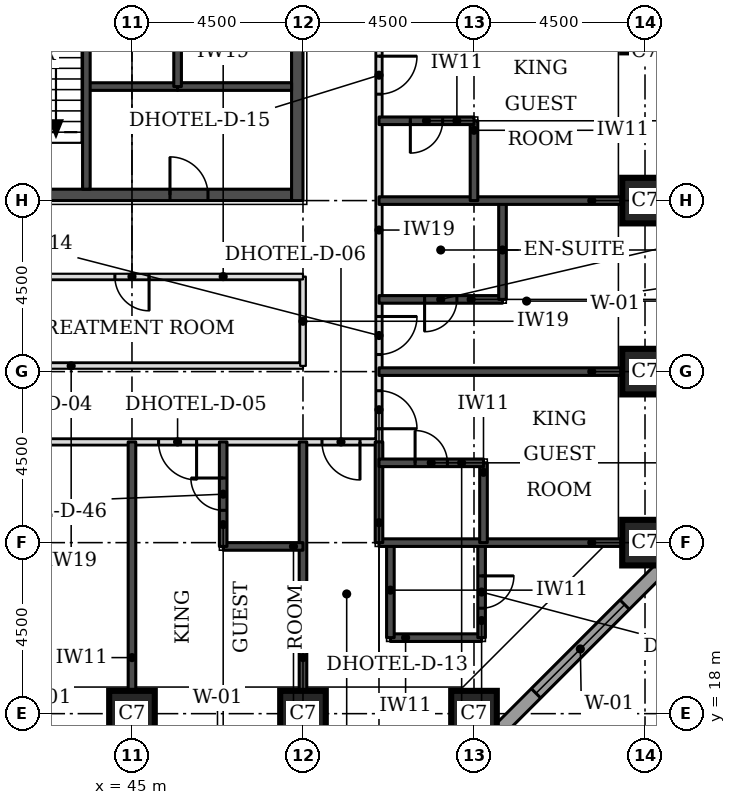
"""IFC4 building model, lengths in metres.
Left out: names, types, materials, properties, quantities, classifications, styles, units other than length and angle.
Written with IfcOpenShell. Run it as: python <this file> out.ifc"""

import sys

from ifc_helpers import new_model, si_unit, direction, frame, frame_2d, origin, origin_2d, place, context, subcontext, project, spatial, rectangle, extrude, element, fill, save


model = new_model("IFC4")
c1 = context("Model", 3, precision=1e-05, world=origin(), true_north=direction((0.0, 1.0)))
c2 = subcontext(c1, "Body", "Model", "MODEL_VIEW")
j1 = project(units=[si_unit("LENGTHUNIT", "METRE"), si_unit("PLANEANGLEUNIT", "RADIAN")], contexts=[c1])
p1 = place(None, origin())
s1 = spatial("IfcSite", under=j1, at=p1, CompositionType="ELEMENT")
p2 = place(p1, origin())
s2 = spatial("IfcBuilding", under=s1, at=p2, CompositionType="ELEMENT")
p3 = place(p2, frame((0.0, 0.0, 36.3)))
s3 = spatial("IfcBuildingStorey", under=s2, at=p3, CompositionType="ELEMENT", Elevation=36.3)
for number, where, z_axis, x_axis in (
    (1, (45.0, 18.0, 0.0), (0.0, 0.0, 1.0), (1.0, 0.0, 0.0)),
    (2, (49.5, 18.0, 0.0), (0.0, 0.0, 1.0), (1.0, 0.0, 0.0)),
    (3, (54.0, 18.0, 0.0), (0.0, 0.0, 1.0), (1.0, 0.0, 0.0)),
    (4, (58.5, 22.5, 0.0), (0.0, 0.0, 1.0), (1.0, 0.0, 0.0)),
    (5, (58.5, 27.0, 0.0), (0.0, 0.0, 1.0), (1.0, 0.0, 0.0)),
    (6, (58.5, 31.5, 0.0), (0.0, 0.0, 1.0), (1.0, 0.0, 0.0)),
):
    element("IfcColumn", number, at=place(p3, frame(where, z_axis=z_axis, x_axis=x_axis)), inside=s3, PredefinedType="COLUMN", context=c2, shape_type="SweptSolid", body=[
        extrude(rectangle(XDim=1.2, YDim=1.2, at=origin_2d()), origin(), (0.0, 0.0, 1.0), 3.3),
    ])
p4 = place(p3, frame((40.8, 31.65, 0.0), z_axis=(0.0, 0.0, 1.0), x_axis=(1.0, 0.0, 0.0)))
e7 = element("IfcWall", 7, at=p4, inside=s3, PredefinedType="SHEAR", context=c2, shape_type="SweptSolid", body=[
    extrude(rectangle(XDim=8.4, YDim=0.3, at=frame_2d((4.2, 0.0))), origin(), (0.0, 0.0, 1.0), 3.3),
])
p5 = place(p4, frame((5.2, 0.0, 0.0)))
e8 = element("IfcOpeningElement", 8, at=p5, cuts=e7, PredefinedType="OPENING", context=c2, shape_type="SweptSolid", body=[
    extrude(rectangle(XDim=1.0, YDim=2.1, at=frame_2d((0.5, 1.05))), frame((0.0, 0.16, 0.0), z_axis=(0.0, -1.0, 0.0), x_axis=(1.0, 0.0, 0.0)), (0.0, 0.0, 1.0), 0.32),
])
p6 = place(p3, frame((49.35, 31.5, 0.0), z_axis=(0.0, 0.0, 1.0), x_axis=(0.0, 1.0, 0.0)))
e9 = element("IfcWall", 9, at=p6, inside=s3, PredefinedType="SHEAR", context=c2, shape_type="SweptSolid", body=[
    extrude(rectangle(XDim=9.0, YDim=0.3, at=frame_2d((4.5, 0.0))), origin(), (0.0, 0.0, 1.0), 3.3),
])
p7 = place(p3, frame((54.27, 17.174, 0.0), z_axis=(0.0, 0.0, 1.0), x_axis=(0.707106781187, 0.707106781187, 0.0)))
e10 = element("IfcWall", 10, at=p7, inside=s3, PredefinedType="STANDARD", context=c2, shape_type="SweptSolid", body=[
    extrude(rectangle(XDim=7.151, YDim=0.35, at=frame_2d((3.576, 0.0))), origin(), (0.0, 0.0, 1.0), 3.055),
])
p8 = place(p7, frame((1.926, 0.0, 0.8)))
e11 = element("IfcOpeningElement", 11, at=p8, cuts=e10, PredefinedType="OPENING", context=c2, shape_type="SweptSolid", body=[
    extrude(rectangle(XDim=3.3, YDim=1.5, at=frame_2d((1.65, 0.75))), frame((0.0, 0.185, 0.0), z_axis=(0.0, -1.0, 0.0), x_axis=(1.0, 0.0, 0.0)), (0.0, 0.0, 1.0), 0.37),
])
p9 = place(p3, frame((19.15, 25.15, 0.0), z_axis=(0.0, 0.0, 1.0), x_axis=(1.0, 0.0, 0.0)))
e12 = element("IfcWall", 12, at=p9, inside=s3, PredefinedType="PARTITIONING", context=c2, shape_type="SweptSolid", body=[
    extrude(rectangle(XDim=32.35, YDim=0.15, at=frame_2d((16.175, 0.0))), origin(), (0.0, 0.0, 1.0), 3.08),
])
p10 = place(p9, frame((6.4, 0.0, 0.0)))
e13 = element("IfcOpeningElement", 13, at=p10, cuts=e12, PredefinedType="OPENING", context=c2, shape_type="SweptSolid", body=[
    extrude(rectangle(XDim=1.0, YDim=2.1, at=frame_2d((0.5, 1.05))), frame((0.0, 0.085, 0.0), z_axis=(0.0, -1.0, 0.0), x_axis=(1.0, 0.0, 0.0)), (0.0, 0.0, 1.0), 0.17),
])
p11 = place(p9, frame((10.5, 0.0, 0.0)))
e14 = element("IfcOpeningElement", 14, at=p11, cuts=e12, PredefinedType="OPENING", context=c2, shape_type="SweptSolid", body=[
    extrude(rectangle(XDim=1.0, YDim=2.1, at=frame_2d((0.5, 1.05))), frame((0.0, 0.085, 0.0), z_axis=(0.0, -1.0, 0.0), x_axis=(1.0, 0.0, 0.0)), (0.0, 0.0, 1.0), 0.17),
])
p12 = place(p9, frame((22.45, 0.0, 0.0)))
e15 = element("IfcOpeningElement", 15, at=p12, cuts=e12, PredefinedType="OPENING", context=c2, shape_type="SweptSolid", body=[
    extrude(rectangle(XDim=1.0, YDim=2.1, at=frame_2d((0.5, 1.05))), frame((0.0, 0.085, 0.0), z_axis=(0.0, -1.0, 0.0), x_axis=(1.0, 0.0, 0.0)), (0.0, 0.0, 1.0), 0.17),
])
p13 = place(p9, frame((26.55, 0.0, 0.0)))
e16 = element("IfcOpeningElement", 16, at=p13, cuts=e12, PredefinedType="OPENING", context=c2, shape_type="SweptSolid", body=[
    extrude(rectangle(XDim=1.0, YDim=2.1, at=frame_2d((0.5, 1.05))), frame((0.0, 0.085, 0.0), z_axis=(0.0, -1.0, 0.0), x_axis=(1.0, 0.0, 0.0)), (0.0, 0.0, 1.0), 0.17),
])
p14 = place(p9, frame((1.175, 0.0, 0.0)))
e17 = element("IfcOpeningElement", 17, at=p14, cuts=e12, PredefinedType="OPENING", context=c2, shape_type="SweptSolid", body=[
    extrude(rectangle(XDim=1.0, YDim=2.1, at=frame_2d((0.5, 1.05))), frame((0.0, 0.085, 0.0), z_axis=(0.0, -1.0, 0.0), x_axis=(1.0, 0.0, 0.0)), (0.0, 0.0, 1.0), 0.17),
])
p15 = place(p9, frame((30.85, 0.0, 0.0)))
e18 = element("IfcOpeningElement", 18, at=p15, cuts=e12, PredefinedType="OPENING", context=c2, shape_type="SweptSolid", body=[
    extrude(rectangle(XDim=1.0, YDim=2.1, at=frame_2d((0.5, 1.05))), frame((0.0, 0.085, 0.0), z_axis=(0.0, -1.0, 0.0), x_axis=(1.0, 0.0, 0.0)), (0.0, 0.0, 1.0), 0.17),
])
p16 = place(p3, frame((51.5, 25.15, 0.0), z_axis=(0.0, 0.0, 1.0), x_axis=(0.0, 1.0, 0.0)))
e19 = element("IfcWall", 19, at=p16, inside=s3, PredefinedType="PARTITIONING", context=c2, shape_type="SweptSolid", body=[
    extrude(rectangle(XDim=22.35, YDim=0.15, at=frame_2d((11.175, 0.0))), origin(), (0.0, 0.0, 1.0), 3.08),
])
p17 = place(p16, frame((0.347, 0.0, 0.0)))
e20 = element("IfcOpeningElement", 20, at=p17, cuts=e19, PredefinedType="OPENING", context=c2, shape_type="SweptSolid", body=[
    extrude(rectangle(XDim=1.0, YDim=2.1, at=frame_2d((0.5, 1.05))), frame((0.0, 0.085, 0.0), z_axis=(0.0, -1.0, 0.0), x_axis=(1.0, 0.0, 0.0)), (0.0, 0.0, 1.0), 0.17),
])
p18 = place(p16, frame((2.3, 0.0, 0.0)))
e21 = element("IfcOpeningElement", 21, at=p18, cuts=e19, PredefinedType="OPENING", context=c2, shape_type="SweptSolid", body=[
    extrude(rectangle(XDim=1.0, YDim=2.1, at=frame_2d((0.5, 1.05))), frame((0.0, 0.085, 0.0), z_axis=(0.0, -1.0, 0.0), x_axis=(1.0, 0.0, 0.0)), (0.0, 0.0, 1.0), 0.17),
])
p19 = place(p16, frame((9.15, 0.0, 0.0)))
e22 = element("IfcOpeningElement", 22, at=p19, cuts=e19, PredefinedType="OPENING", context=c2, shape_type="SweptSolid", body=[
    extrude(rectangle(XDim=1.0, YDim=2.1, at=frame_2d((0.5, 1.05))), frame((0.0, 0.085, 0.0), z_axis=(0.0, -1.0, 0.0), x_axis=(1.0, 0.0, 0.0)), (0.0, 0.0, 1.0), 0.17),
])
p20 = place(p16, frame((11.3, 0.0, 0.0)))
e23 = element("IfcOpeningElement", 23, at=p20, cuts=e19, PredefinedType="OPENING", context=c2, shape_type="SweptSolid", body=[
    extrude(rectangle(XDim=1.0, YDim=2.1, at=frame_2d((0.5, 1.05))), frame((0.0, 0.085, 0.0), z_axis=(0.0, -1.0, 0.0), x_axis=(1.0, 0.0, 0.0)), (0.0, 0.0, 1.0), 0.17),
])
p21 = place(p16, frame((18.4, 0.0, 0.0)))
e24 = element("IfcOpeningElement", 24, at=p21, cuts=e19, PredefinedType="OPENING", context=c2, shape_type="SweptSolid", body=[
    extrude(rectangle(XDim=0.9, YDim=2.1, at=frame_2d((0.45, 1.05))), frame((0.0, 0.085, 0.0), z_axis=(0.0, -1.0, 0.0), x_axis=(1.0, 0.0, 0.0)), (0.0, 0.0, 1.0), 0.17),
])
p22 = place(p3, frame((40.5, 27.15, 0.0), z_axis=(0.0, 0.0, 1.0), x_axis=(1.0, 0.0, 0.0)))
e25 = element("IfcWall", 25, at=p22, inside=s3, PredefinedType="PARTITIONING", context=c2, shape_type="SweptSolid", body=[
    extrude(rectangle(XDim=9.0, YDim=0.15, at=frame_2d((4.5, 0.0))), origin(), (0.0, 0.0, 1.0), 3.08),
])
p23 = place(p3, frame((49.5, 27.15, 0.0), z_axis=(0.0, 0.0, 1.0), x_axis=(0.0, 1.0, 0.0)))
e26 = element("IfcWall", 26, at=p23, inside=s3, PredefinedType="PARTITIONING", context=c2, shape_type="SweptSolid", body=[
    extrude(rectangle(XDim=2.35, YDim=0.15, at=frame_2d((1.175, 0.0))), origin(), (0.0, 0.0, 1.0), 3.08),
])
p24 = place(p3, frame((40.5, 29.5, 0.0), z_axis=(0.0, 0.0, 1.0), x_axis=(1.0, 0.0, 0.0)))
e27 = element("IfcWall", 27, at=p24, inside=s3, PredefinedType="PARTITIONING", context=c2, shape_type="SweptSolid", body=[
    extrude(rectangle(XDim=9.0, YDim=0.15, at=frame_2d((4.5, 0.0))), origin(), (0.0, 0.0, 1.0), 3.08),
])
p25 = place(p24, frame((4.05, 0.0, 0.0)))
e28 = element("IfcOpeningElement", 28, at=p25, cuts=e27, PredefinedType="OPENING", context=c2, shape_type="SweptSolid", body=[
    extrude(rectangle(XDim=0.9, YDim=2.1, at=frame_2d((0.45, 1.05))), frame((0.0, 0.085, 0.0), z_axis=(0.0, -1.0, 0.0), x_axis=(1.0, 0.0, 0.0)), (0.0, 0.0, 1.0), 0.17),
])
for number, where, z_axis, x_axis in (
    (29, (45.0, 18.6, 0.0), (0.0, 0.0, 1.0), (0.0, 1.0, 0.0)),
    (30, (49.5, 18.6, 0.0), (0.0, 0.0, 1.0), (0.0, 1.0, 0.0)),
):
    element("IfcWall", number, at=place(p3, frame(where, z_axis=z_axis, x_axis=x_axis)), inside=s3, PredefinedType="SOLIDWALL", context=c2, shape_type="SweptSolid", body=[
        extrude(rectangle(XDim=6.55, YDim=0.2, at=frame_2d((3.275, 0.0))), origin(), (0.0, 0.0, 1.0), 3.08),
    ])
p26 = place(p3, frame((51.8, 20.0, 0.0), z_axis=(0.0, 0.0, 1.0), x_axis=(1.0, 0.0, 0.0)))
e31 = element("IfcWall", 31, at=p26, inside=s3, PredefinedType="SOLIDWALL", context=c2, shape_type="SweptSolid", body=[
    extrude(rectangle(XDim=2.4, YDim=0.2, at=frame_2d((1.2, 0.0))), origin(), (0.0, 0.0, 1.0), 3.08),
])
p27 = place(p3, frame((51.8, 20.0, 0.0), z_axis=(0.0, 0.0, 1.0), x_axis=(0.0, 1.0, 0.0)))
e32 = element("IfcWall", 32, at=p27, inside=s3, PredefinedType="SOLIDWALL", context=c2, shape_type="SweptSolid", body=[
    extrude(rectangle(XDim=2.5, YDim=0.2, at=frame_2d((1.25, 0.0))), origin(), (0.0, 0.0, 1.0), 3.08),
])
p28 = place(p3, frame((54.2, 20.0, 0.0), z_axis=(0.0, 0.0, 1.0), x_axis=(0.0, 1.0, 0.0)))
e33 = element("IfcWall", 33, at=p28, inside=s3, PredefinedType="SOLIDWALL", context=c2, shape_type="SweptSolid", body=[
    extrude(rectangle(XDim=2.5, YDim=0.2, at=frame_2d((1.25, 0.0))), origin(), (0.0, 0.0, 1.0), 3.08),
])
p29 = place(p28, frame((0.775, 0.0, 0.0)))
e34 = element("IfcOpeningElement", 34, at=p29, cuts=e33, PredefinedType="OPENING", context=c2, shape_type="SweptSolid", body=[
    extrude(rectangle(XDim=0.85, YDim=2.1, at=frame_2d((0.425, 1.05))), frame((0.0, 0.11, 0.0), z_axis=(0.0, -1.0, 0.0), x_axis=(1.0, 0.0, 0.0)), (0.0, 0.0, 1.0), 0.22),
])
p30 = place(p3, frame((47.4, 22.4, 0.0), z_axis=(0.0, 0.0, 1.0), x_axis=(1.0, 0.0, 0.0)))
e35 = element("IfcWall", 35, at=p30, inside=s3, PredefinedType="SOLIDWALL", context=c2, shape_type="SweptSolid", body=[
    extrude(rectangle(XDim=2.1, YDim=0.2, at=frame_2d((1.05, 0.0))), origin(), (0.0, 0.0, 1.0), 3.08),
])
p31 = place(p3, frame((47.4, 22.4, 0.0), z_axis=(0.0, 0.0, 1.0), x_axis=(0.0, 1.0, 0.0)))
e36 = element("IfcWall", 36, at=p31, inside=s3, PredefinedType="SOLIDWALL", context=c2, shape_type="SweptSolid", body=[
    extrude(rectangle(XDim=2.75, YDim=0.2, at=frame_2d((1.375, 0.0))), origin(), (0.0, 0.0, 1.0), 3.08),
])
p32 = place(p31, frame((0.95, 0.0, 0.0)))
e37 = element("IfcOpeningElement", 37, at=p32, cuts=e36, PredefinedType="OPENING", context=c2, shape_type="SweptSolid", body=[
    extrude(rectangle(XDim=0.85, YDim=2.1, at=frame_2d((0.425, 1.05))), frame((0.0, 0.11, 0.0), z_axis=(0.0, -1.0, 0.0), x_axis=(1.0, 0.0, 0.0)), (0.0, 0.0, 1.0), 0.22),
])
p33 = place(p3, frame((51.5, 22.5, 0.0), z_axis=(0.0, 0.0, 1.0), x_axis=(1.0, 0.0, 0.0)))
e38 = element("IfcWall", 38, at=p33, inside=s3, PredefinedType="SOLIDWALL", context=c2, shape_type="SweptSolid", body=[
    extrude(rectangle(XDim=6.4, YDim=0.2, at=frame_2d((3.2, 0.0))), origin(), (0.0, 0.0, 1.0), 3.08),
])
p34 = place(p3, frame((51.5, 22.5, 0.0), z_axis=(0.0, 0.0, 1.0), x_axis=(0.0, 1.0, 0.0)))
e39 = element("IfcWall", 39, at=p34, inside=s3, PredefinedType="SOLIDWALL", context=c2, shape_type="SweptSolid", body=[
    extrude(rectangle(XDim=2.65, YDim=0.2, at=frame_2d((1.325, 0.0))), origin(), (0.0, 0.0, 1.0), 3.08),
])
p35 = place(p3, frame((54.25, 22.5, 0.0), z_axis=(0.0, 0.0, 1.0), x_axis=(0.0, 1.0, 0.0)))
e40 = element("IfcWall", 40, at=p35, inside=s3, PredefinedType="SOLIDWALL", context=c2, shape_type="SweptSolid", body=[
    extrude(rectangle(XDim=2.1, YDim=0.2, at=frame_2d((1.05, 0.0))), origin(), (0.0, 0.0, 1.0), 3.08),
])
p36 = place(p3, frame((51.5, 24.6, 0.0), z_axis=(0.0, 0.0, 1.0), x_axis=(1.0, 0.0, 0.0)))
e41 = element("IfcWall", 41, at=p36, inside=s3, PredefinedType="SOLIDWALL", context=c2, shape_type="SweptSolid", body=[
    extrude(rectangle(XDim=2.75, YDim=0.2, at=frame_2d((1.375, 0.0))), origin(), (0.0, 0.0, 1.0), 3.08),
])
p37 = place(p36, frame((0.95, 0.0, 0.0)))
e42 = element("IfcOpeningElement", 42, at=p37, cuts=e41, PredefinedType="OPENING", context=c2, shape_type="SweptSolid", body=[
    extrude(rectangle(XDim=0.85, YDim=2.1, at=frame_2d((0.425, 1.05))), frame((0.0, 0.11, 0.0), z_axis=(0.0, -1.0, 0.0), x_axis=(1.0, 0.0, 0.0)), (0.0, 0.0, 1.0), 0.22),
])
p38 = place(p3, frame((51.5, 27.0, 0.0), z_axis=(0.0, 0.0, 1.0), x_axis=(1.0, 0.0, 0.0)))
e43 = element("IfcWall", 43, at=p38, inside=s3, PredefinedType="SOLIDWALL", context=c2, shape_type="SweptSolid", body=[
    extrude(rectangle(XDim=6.4, YDim=0.2, at=frame_2d((3.2, 0.0))), origin(), (0.0, 0.0, 1.0), 3.08),
])
p39 = place(p3, frame((51.5, 28.9, 0.0), z_axis=(0.0, 0.0, 1.0), x_axis=(1.0, 0.0, 0.0)))
e44 = element("IfcWall", 44, at=p39, inside=s3, PredefinedType="SOLIDWALL", context=c2, shape_type="SweptSolid", body=[
    extrude(rectangle(XDim=3.25, YDim=0.2, at=frame_2d((1.625, 0.0))), origin(), (0.0, 0.0, 1.0), 3.08),
])
p40 = place(p39, frame((1.2, 0.0, 0.0)))
e45 = element("IfcOpeningElement", 45, at=p40, cuts=e44, PredefinedType="OPENING", context=c2, shape_type="SweptSolid", body=[
    extrude(rectangle(XDim=0.85, YDim=2.1, at=frame_2d((0.425, 1.05))), frame((0.0, 0.11, 0.0), z_axis=(0.0, -1.0, 0.0), x_axis=(1.0, 0.0, 0.0)), (0.0, 0.0, 1.0), 0.22),
])
p41 = place(p3, frame((54.75, 28.9, 0.0), z_axis=(0.0, 0.0, 1.0), x_axis=(0.0, 1.0, 0.0)))
e46 = element("IfcWall", 46, at=p41, inside=s3, PredefinedType="SOLIDWALL", context=c2, shape_type="SweptSolid", body=[
    extrude(rectangle(XDim=2.6, YDim=0.2, at=frame_2d((1.3, 0.0))), origin(), (0.0, 0.0, 1.0), 3.08),
])
p42 = place(p3, frame((51.5, 31.5, 0.0), z_axis=(0.0, 0.0, 1.0), x_axis=(1.0, 0.0, 0.0)))
e47 = element("IfcWall", 47, at=p42, inside=s3, PredefinedType="SOLIDWALL", context=c2, shape_type="SweptSolid", body=[
    extrude(rectangle(XDim=6.4, YDim=0.2, at=frame_2d((3.2, 0.0))), origin(), (0.0, 0.0, 1.0), 3.08),
])
p43 = place(p3, frame((54.0, 31.5, 0.0), z_axis=(0.0, 0.0, 1.0), x_axis=(0.0, 1.0, 0.0)))
e48 = element("IfcWall", 48, at=p43, inside=s3, PredefinedType="SOLIDWALL", context=c2, shape_type="SweptSolid", body=[
    extrude(rectangle(XDim=2.1, YDim=0.2, at=frame_2d((1.05, 0.0))), origin(), (0.0, 0.0, 1.0), 3.08),
])
p44 = place(p3, frame((51.5, 33.6, 0.0), z_axis=(0.0, 0.0, 1.0), x_axis=(1.0, 0.0, 0.0)))
e49 = element("IfcWall", 49, at=p44, inside=s3, PredefinedType="SOLIDWALL", context=c2, shape_type="SweptSolid", body=[
    extrude(rectangle(XDim=2.5, YDim=0.2, at=frame_2d((1.25, 0.0))), origin(), (0.0, 0.0, 1.0), 3.08),
])
p45 = place(p44, frame((0.825, 0.0, 0.0)))
e50 = element("IfcOpeningElement", 50, at=p45, cuts=e49, PredefinedType="OPENING", context=c2, shape_type="SweptSolid", body=[
    extrude(rectangle(XDim=0.85, YDim=2.1, at=frame_2d((0.425, 1.05))), frame((0.0, 0.11, 0.0), z_axis=(0.0, -1.0, 0.0), x_axis=(1.0, 0.0, 0.0)), (0.0, 0.0, 1.0), 0.22),
])
p46 = place(p3, frame((43.8, 34.5, 0.0), z_axis=(0.0, 0.0, 1.0), x_axis=(1.0, 0.0, 0.0)))
e51 = element("IfcWall", 51, at=p46, inside=s3, PredefinedType="SOLIDWALL", context=c2, shape_type="SweptSolid", body=[
    extrude(rectangle(XDim=2.4, YDim=0.2, at=frame_2d((1.2, 0.0))), origin(), (0.0, 0.0, 1.0), 3.08),
])
p47 = place(p3, frame((46.2, 34.5, 0.0), z_axis=(0.0, 0.0, 1.0), x_axis=(1.0, 0.0, 0.0)))
e52 = element("IfcWall", 52, at=p47, inside=s3, PredefinedType="SOLIDWALL", context=c2, shape_type="SweptSolid", body=[
    extrude(rectangle(XDim=3.0, YDim=0.2, at=frame_2d((1.5, 0.0))), origin(), (0.0, 0.0, 1.0), 3.08),
])
for number, where, z_axis, x_axis in (
    (53, (43.8, 31.8, 0.0), (0.0, 0.0, 1.0), (0.0, 1.0, 0.0)),
    (54, (46.2, 34.5, 0.0), (0.0, 0.0, 1.0), (0.0, 1.0, 0.0)),
):
    element("IfcWall", number, at=place(p3, frame(where, z_axis=z_axis, x_axis=x_axis)), inside=s3, PredefinedType="SOLIDWALL", context=c2, shape_type="SweptSolid", body=[
        extrude(rectangle(XDim=5.7, YDim=0.2, at=frame_2d((2.85, 0.0))), origin(), (0.0, 0.0, 1.0), 3.08),
    ])
p48 = place(p8, origin())
e55 = element("IfcWindow", 55, at=p48, inside=s3, PartitioningType="SINGLE_PANEL", PredefinedType="WINDOW", context=c2, shape_type="SweptSolid", body=[
    extrude(rectangle(XDim=3.3, YDim=1.5, at=frame_2d((1.65, 0.75))), frame((0.0, 0.085, 0.0), z_axis=(0.0, -1.0, 0.0), x_axis=(1.0, 0.0, 0.0)), (0.0, 0.0, 1.0), 0.06),
])
fill(e11, e55)
p49 = place(p13, frame((1.0, 0.0, 0.0), z_axis=(0.0, 0.0, 1.0), x_axis=(-1.0, 0.0, 0.0)))
e56 = element("IfcDoor", 56, at=p49, inside=s3, OperationType="SINGLE_SWING_LEFT", PredefinedType="DOOR", context=c2, shape_type="SweptSolid", body=[
    extrude(rectangle(XDim=1.0, YDim=2.1, at=frame_2d((0.5, 1.05))), frame((0.0, 0.025, 0.0), z_axis=(0.0, -1.0, 0.0), x_axis=(1.0, 0.0, 0.0)), (0.0, 0.0, 1.0), 0.05),
])
fill(e16, e56)
p50 = place(p32, origin())
e57 = element("IfcDoor", 57, at=p50, inside=s3, OperationType="SINGLE_SWING_RIGHT", PredefinedType="DOOR", context=c2, shape_type="SweptSolid", body=[
    extrude(rectangle(XDim=0.85, YDim=2.1, at=frame_2d((0.425, 1.05))), frame((0.0, 0.025, 0.0), z_axis=(0.0, -1.0, 0.0), x_axis=(1.0, 0.0, 0.0)), (0.0, 0.0, 1.0), 0.05),
])
fill(e37, e57)
p51 = place(p17, frame((1.0, 0.0, 0.0), z_axis=(0.0, 0.0, 1.0), x_axis=(-1.0, 0.0, 0.0)))
e58 = element("IfcDoor", 58, at=p51, inside=s3, OperationType="SINGLE_SWING_RIGHT", PredefinedType="DOOR", context=c2, shape_type="SweptSolid", body=[
    extrude(rectangle(XDim=1.0, YDim=2.1, at=frame_2d((0.5, 1.05))), frame((0.0, 0.025, 0.0), z_axis=(0.0, -1.0, 0.0), x_axis=(1.0, 0.0, 0.0)), (0.0, 0.0, 1.0), 0.05),
])
fill(e20, e58)
p52 = place(p37, origin())
e59 = element("IfcDoor", 59, at=p52, inside=s3, OperationType="SINGLE_SWING_LEFT", PredefinedType="DOOR", context=c2, shape_type="SweptSolid", body=[
    extrude(rectangle(XDim=0.85, YDim=2.1, at=frame_2d((0.425, 1.05))), frame((0.0, 0.025, 0.0), z_axis=(0.0, -1.0, 0.0), x_axis=(1.0, 0.0, 0.0)), (0.0, 0.0, 1.0), 0.05),
])
fill(e42, e59)
p53 = place(p18, frame((1.0, 0.0, 0.0), z_axis=(0.0, 0.0, 1.0), x_axis=(-1.0, 0.0, 0.0)))
e60 = element("IfcDoor", 60, at=p53, inside=s3, OperationType="SINGLE_SWING_LEFT", PredefinedType="DOOR", context=c2, shape_type="SweptSolid", body=[
    extrude(rectangle(XDim=1.0, YDim=2.1, at=frame_2d((0.5, 1.05))), frame((0.0, 0.025, 0.0), z_axis=(0.0, -1.0, 0.0), x_axis=(1.0, 0.0, 0.0)), (0.0, 0.0, 1.0), 0.05),
])
fill(e21, e60)
p54 = place(p40, frame((0.85, 0.0, 0.0), z_axis=(0.0, 0.0, 1.0), x_axis=(-1.0, 0.0, 0.0)))
e61 = element("IfcDoor", 61, at=p54, inside=s3, OperationType="SINGLE_SWING_RIGHT", PredefinedType="DOOR", context=c2, shape_type="SweptSolid", body=[
    extrude(rectangle(XDim=0.85, YDim=2.1, at=frame_2d((0.425, 1.05))), frame((0.0, 0.025, 0.0), z_axis=(0.0, -1.0, 0.0), x_axis=(1.0, 0.0, 0.0)), (0.0, 0.0, 1.0), 0.05),
])
fill(e45, e61)
p55 = place(p19, frame((1.0, 0.0, 0.0), z_axis=(0.0, 0.0, 1.0), x_axis=(-1.0, 0.0, 0.0)))
e62 = element("IfcDoor", 62, at=p55, inside=s3, OperationType="SINGLE_SWING_LEFT", PredefinedType="DOOR", context=c2, shape_type="SweptSolid", body=[
    extrude(rectangle(XDim=1.0, YDim=2.1, at=frame_2d((0.5, 1.05))), frame((0.0, 0.025, 0.0), z_axis=(0.0, -1.0, 0.0), x_axis=(1.0, 0.0, 0.0)), (0.0, 0.0, 1.0), 0.05),
])
fill(e22, e62)
p56 = place(p45, frame((0.85, 0.0, 0.0), z_axis=(0.0, 0.0, 1.0), x_axis=(-1.0, 0.0, 0.0)))
e63 = element("IfcDoor", 63, at=p56, inside=s3, OperationType="SINGLE_SWING_RIGHT", PredefinedType="DOOR", context=c2, shape_type="SweptSolid", body=[
    extrude(rectangle(XDim=0.85, YDim=2.1, at=frame_2d((0.425, 1.05))), frame((0.0, 0.025, 0.0), z_axis=(0.0, -1.0, 0.0), x_axis=(1.0, 0.0, 0.0)), (0.0, 0.0, 1.0), 0.05),
])
fill(e50, e63)
p57 = place(p15, frame((1.0, 0.0, 0.0), z_axis=(0.0, 0.0, 1.0), x_axis=(-1.0, 0.0, 0.0)))
e64 = element("IfcDoor", 64, at=p57, inside=s3, OperationType="SINGLE_SWING_LEFT", PredefinedType="DOOR", context=c2, shape_type="SweptSolid", body=[
    extrude(rectangle(XDim=1.0, YDim=2.1, at=frame_2d((0.5, 1.05))), frame((0.0, 0.025, 0.0), z_axis=(0.0, -1.0, 0.0), x_axis=(1.0, 0.0, 0.0)), (0.0, 0.0, 1.0), 0.05),
])
fill(e18, e64)
p58 = place(p29, frame((0.85, 0.0, 0.0), z_axis=(0.0, 0.0, 1.0), x_axis=(-1.0, 0.0, 0.0)))
e65 = element("IfcDoor", 65, at=p58, inside=s3, OperationType="SINGLE_SWING_LEFT", PredefinedType="DOOR", context=c2, shape_type="SweptSolid", body=[
    extrude(rectangle(XDim=0.85, YDim=2.1, at=frame_2d((0.425, 1.05))), frame((0.0, 0.025, 0.0), z_axis=(0.0, -1.0, 0.0), x_axis=(1.0, 0.0, 0.0)), (0.0, 0.0, 1.0), 0.05),
])
fill(e34, e65)
p59 = place(p25, frame((0.9, 0.0, 0.0), z_axis=(0.0, 0.0, 1.0), x_axis=(-1.0, 0.0, 0.0)))
e66 = element("IfcDoor", 66, at=p59, inside=s3, OperationType="SINGLE_SWING_LEFT", PredefinedType="DOOR", context=c2, shape_type="SweptSolid", body=[
    extrude(rectangle(XDim=0.9, YDim=2.1, at=frame_2d((0.45, 1.05))), frame((0.0, 0.025, 0.0), z_axis=(0.0, -1.0, 0.0), x_axis=(1.0, 0.0, 0.0)), (0.0, 0.0, 1.0), 0.05),
])
fill(e28, e66)
p60 = place(p5, origin())
e67 = element("IfcDoor", 67, at=p60, inside=s3, OperationType="SINGLE_SWING_LEFT", PredefinedType="DOOR", context=c2, shape_type="SweptSolid", body=[
    extrude(rectangle(XDim=1.0, YDim=2.1, at=frame_2d((0.5, 1.05))), frame((0.0, 0.025, 0.0), z_axis=(0.0, -1.0, 0.0), x_axis=(1.0, 0.0, 0.0)), (0.0, 0.0, 1.0), 0.05),
])
fill(e8, e67)
save(model, sys.argv[1])
